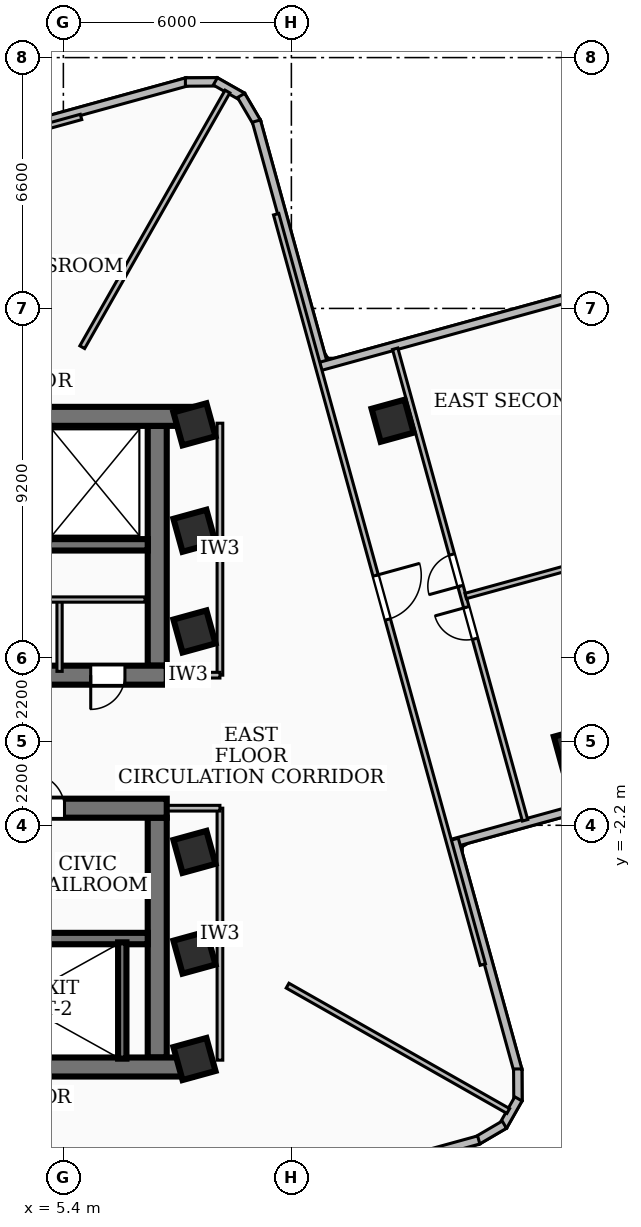
"""IFC4 building model, lengths in metres.
Left out: names, types, materials, properties, quantities, classifications, styles, units other than length and angle.
Written with IfcOpenShell. Run it as: python <this file> out.ifc"""

import sys

from ifc_helpers import new_model, si_unit, direction, frame, frame_2d, origin, origin_2d, place, context, subcontext, project, spatial, rectangle, extrude, element, fill, save


model = new_model("IFC4")
c1 = context("Model", 3, precision=1e-05, world=origin(), true_north=direction((0.0, 1.0)))
c2 = subcontext(c1, "Body", "Model", "MODEL_VIEW")
j1 = project(units=[si_unit("LENGTHUNIT", "METRE"), si_unit("PLANEANGLEUNIT", "RADIAN")], contexts=[c1])
p1 = place(None, origin())
s1 = spatial("IfcSite", under=j1, at=p1, CompositionType="ELEMENT")
p2 = place(p1, origin())
s2 = spatial("IfcBuilding", under=s1, at=p2, CompositionType="ELEMENT")
p3 = place(p2, frame((0.0, 0.0, 137.88)))
s3 = spatial("IfcBuildingStorey", under=s2, at=p3, CompositionType="ELEMENT", Elevation=137.88)
p4 = place(p3, frame((-8.78, 8.56, 0.0), z_axis=(0.0, 0.0, 1.0), x_axis=(1.0, 0.0, 0.0)))
e1 = element("IfcWall", 1, at=p4, inside=s3, PredefinedType="SHEAR", context=c2, shape_type="SweptSolid", body=[
    extrude(rectangle(XDim=17.56, YDim=0.5, at=frame_2d((8.78, 0.0))), origin(), (0.0, 0.0, 1.0), 3.32),
])
p5 = place(p3, frame((8.12, 1.75, 0.0), z_axis=(0.0, 0.0, 1.0), x_axis=(-1.0, 0.0, 0.0)))
e2 = element("IfcWall", 2, at=p5, inside=s3, PredefinedType="SHEAR", context=c2, shape_type="SweptSolid", body=[
    extrude(rectangle(XDim=16.24, YDim=0.5, at=frame_2d((8.12, 0.0))), origin(), (0.0, 0.0, 1.0), 3.32),
])
p6 = place(p5, frame((7.45, 0.0, 0.0)))
e3 = element("IfcOpeningElement", 3, at=p6, cuts=e2, PredefinedType="OPENING", context=c2, shape_type="SweptSolid", body=[
    extrude(rectangle(XDim=1.0, YDim=2.1, at=frame_2d((0.5, 1.05))), frame((0.0, 0.26, 0.0), z_axis=(0.0, -1.0, 0.0), x_axis=(1.0, 0.0, 0.0)), (0.0, 0.0, 1.0), 0.52),
])
p7 = place(p5, frame((3.4, 0.0, 0.0)))
e4 = element("IfcOpeningElement", 4, at=p7, cuts=e2, PredefinedType="OPENING", context=c2, shape_type="SweptSolid", body=[
    extrude(rectangle(XDim=0.9, YDim=2.06, at=frame_2d((0.45, 1.03))), frame((0.0, 0.26, 0.0), z_axis=(0.0, -1.0, 0.0), x_axis=(1.0, 0.0, 0.0)), (0.0, 0.0, 1.0), 0.52),
])
p8 = place(p5, frame((1.1, 0.0, 0.0)))
e5 = element("IfcOpeningElement", 5, at=p8, cuts=e2, PredefinedType="OPENING", context=c2, shape_type="SweptSolid", body=[
    extrude(rectangle(XDim=0.9, YDim=2.06, at=frame_2d((0.45, 1.03))), frame((0.0, 0.26, 0.0), z_axis=(0.0, -1.0, 0.0), x_axis=(1.0, 0.0, 0.0)), (0.0, 0.0, 1.0), 0.52),
])
p9 = place(p3, frame((7.87, 8.31, 0.0), z_axis=(0.0, 0.0, 1.0), x_axis=(0.0, -1.0, 0.0)))
e6 = element("IfcWall", 6, at=p9, inside=s3, PredefinedType="SHEAR", context=c2, shape_type="SweptSolid", body=[
    extrude(rectangle(XDim=6.31, YDim=0.5, at=frame_2d((3.155, 0.0))), origin(), (0.0, 0.0, 1.0), 3.32),
])
p10 = place(p3, frame((7.62, 5.18, 0.0), z_axis=(0.0, 0.0, 1.0), x_axis=(-1.0, 0.0, 0.0)))
e7 = element("IfcWall", 7, at=p10, inside=s3, PredefinedType="SOLIDWALL", context=c2, shape_type="SweptSolid", body=[
    extrude(rectangle(XDim=15.24, YDim=0.3, at=frame_2d((7.62, 0.0))), origin(), (0.0, 0.0, 1.0), 3.32),
])
p11 = place(p10, frame((5.77, 0.0, 0.0)))
e8 = element("IfcOpeningElement", 8, at=p11, cuts=e7, PredefinedType="OPENING", context=c2, shape_type="SweptSolid", body=[
    extrude(rectangle(XDim=1.1, YDim=2.15, at=frame_2d((0.55, 1.075))), frame((0.0, 0.16, 0.0), z_axis=(0.0, -1.0, 0.0), x_axis=(1.0, 0.0, 0.0)), (0.0, 0.0, 1.0), 0.32),
])
p12 = place(p10, frame((2.97, 0.0, 0.0)))
e9 = element("IfcOpeningElement", 9, at=p12, cuts=e7, PredefinedType="OPENING", context=c2, shape_type="SweptSolid", body=[
    extrude(rectangle(XDim=1.1, YDim=2.15, at=frame_2d((0.55, 1.075))), frame((0.0, 0.16, 0.0), z_axis=(0.0, -1.0, 0.0), x_axis=(1.0, 0.0, 0.0)), (0.0, 0.0, 1.0), 0.32),
])
p13 = place(p10, frame((7.97, 0.0, 0.0)))
e10 = element("IfcOpeningElement", 10, at=p13, cuts=e7, PredefinedType="OPENING", context=c2, shape_type="SweptSolid", body=[
    extrude(rectangle(XDim=1.0, YDim=2.1, at=frame_2d((0.5, 1.05))), frame((0.0, 0.16, 0.0), z_axis=(0.0, -1.0, 0.0), x_axis=(1.0, 0.0, 0.0)), (0.0, 0.0, 1.0), 0.32),
])
p14 = place(p3, frame((8.78, -8.56, 0.0), z_axis=(0.0, 0.0, 1.0), x_axis=(-1.0, 0.0, 0.0)))
e11 = element("IfcWall", 11, at=p14, inside=s3, PredefinedType="SHEAR", context=c2, shape_type="SweptSolid", body=[
    extrude(rectangle(XDim=17.56, YDim=0.5, at=frame_2d((8.78, 0.0))), origin(), (0.0, 0.0, 1.0), 3.32),
])
p15 = place(p3, frame((-8.12, -1.75, 0.0), z_axis=(0.0, 0.0, 1.0), x_axis=(1.0, 0.0, 0.0)))
e12 = element("IfcWall", 12, at=p15, inside=s3, PredefinedType="SHEAR", context=c2, shape_type="SweptSolid", body=[
    extrude(rectangle(XDim=16.24, YDim=0.5, at=frame_2d((8.12, 0.0))), origin(), (0.0, 0.0, 1.0), 3.32),
])
p16 = place(p15, frame((7.45, 0.0, 0.0)))
e13 = element("IfcOpeningElement", 13, at=p16, cuts=e12, PredefinedType="OPENING", context=c2, shape_type="SweptSolid", body=[
    extrude(rectangle(XDim=1.0, YDim=2.1, at=frame_2d((0.5, 1.05))), frame((0.0, 0.26, 0.0), z_axis=(0.0, -1.0, 0.0), x_axis=(1.0, 0.0, 0.0)), (0.0, 0.0, 1.0), 0.52),
])
p17 = place(p15, frame((12.65, 0.0, 0.0)))
e14 = element("IfcOpeningElement", 14, at=p17, cuts=e12, PredefinedType="OPENING", context=c2, shape_type="SweptSolid", body=[
    extrude(rectangle(XDim=0.9, YDim=2.06, at=frame_2d((0.45, 1.03))), frame((0.0, 0.26, 0.0), z_axis=(0.0, -1.0, 0.0), x_axis=(1.0, 0.0, 0.0)), (0.0, 0.0, 1.0), 0.52),
])
p18 = place(p15, frame((0.565, 0.0, 0.0)))
e15 = element("IfcOpeningElement", 15, at=p18, cuts=e12, PredefinedType="OPENING", context=c2, shape_type="SweptSolid", body=[
    extrude(rectangle(XDim=1.05, YDim=2.15, at=frame_2d((0.525, 1.075))), frame((0.0, 0.26, 0.0), z_axis=(0.0, -1.0, 0.0), x_axis=(1.0, 0.0, 0.0)), (0.0, 0.0, 1.0), 0.52),
])
p19 = place(p15, frame((2.125, 0.0, 0.0)))
e16 = element("IfcOpeningElement", 16, at=p19, cuts=e12, PredefinedType="OPENING", context=c2, shape_type="SweptSolid", body=[
    extrude(rectangle(XDim=1.05, YDim=2.15, at=frame_2d((0.525, 1.075))), frame((0.0, 0.26, 0.0), z_axis=(0.0, -1.0, 0.0), x_axis=(1.0, 0.0, 0.0)), (0.0, 0.0, 1.0), 0.52),
])
p20 = place(p15, frame((3.685, 0.0, 0.0)))
e17 = element("IfcOpeningElement", 17, at=p20, cuts=e12, PredefinedType="OPENING", context=c2, shape_type="SweptSolid", body=[
    extrude(rectangle(XDim=1.05, YDim=2.15, at=frame_2d((0.525, 1.075))), frame((0.0, 0.26, 0.0), z_axis=(0.0, -1.0, 0.0), x_axis=(1.0, 0.0, 0.0)), (0.0, 0.0, 1.0), 0.52),
])
p21 = place(p3, frame((7.87, -2.0, 0.0), z_axis=(0.0, 0.0, 1.0), x_axis=(0.0, -1.0, 0.0)))
e18 = element("IfcWall", 18, at=p21, inside=s3, PredefinedType="SHEAR", context=c2, shape_type="SweptSolid", body=[
    extrude(rectangle(XDim=6.31, YDim=0.5, at=frame_2d((3.155, 0.0))), origin(), (0.0, 0.0, 1.0), 3.32),
])
p22 = place(p3, frame((-7.62, -5.18, 0.0), z_axis=(0.0, 0.0, 1.0), x_axis=(1.0, 0.0, 0.0)))
e19 = element("IfcWall", 19, at=p22, inside=s3, PredefinedType="SOLIDWALL", context=c2, shape_type="SweptSolid", body=[
    extrude(rectangle(XDim=15.24, YDim=0.3, at=frame_2d((7.62, 0.0))), origin(), (0.0, 0.0, 1.0), 3.32),
])
p23 = place(p22, frame((5.77, 0.0, 0.0)))
e20 = element("IfcOpeningElement", 20, at=p23, cuts=e19, PredefinedType="OPENING", context=c2, shape_type="SweptSolid", body=[
    extrude(rectangle(XDim=1.1, YDim=2.15, at=frame_2d((0.55, 1.075))), frame((0.0, 0.16, 0.0), z_axis=(0.0, -1.0, 0.0), x_axis=(1.0, 0.0, 0.0)), (0.0, 0.0, 1.0), 0.32),
])
p24 = place(p22, frame((7.97, 0.0, 0.0)))
e21 = element("IfcOpeningElement", 21, at=p24, cuts=e19, PredefinedType="OPENING", context=c2, shape_type="SweptSolid", body=[
    extrude(rectangle(XDim=1.0, YDim=2.1, at=frame_2d((0.5, 1.05))), frame((0.0, 0.16, 0.0), z_axis=(0.0, -1.0, 0.0), x_axis=(1.0, 0.0, 0.0)), (0.0, 0.0, 1.0), 0.32),
])
p25 = place(p3, frame((6.95, -8.34, 0.0), z_axis=(0.0, 0.0, 1.0), x_axis=(0.0, 1.0, 0.0)))
e22 = element("IfcWall", 22, at=p25, inside=s3, PredefinedType="SOLIDWALL", context=c2, shape_type="SweptSolid", body=[
    extrude(rectangle(XDim=3.06, YDim=0.22, at=frame_2d((1.53, 0.0))), origin(), (0.0, 0.0, 1.0), 3.32),
])
for number, where, z_axis, x_axis in (
    (23, (8.85, -5.55, 0.0), (0.0, 0.0, 1.0), (0.964, 0.266, 0.0)),
    (24, (8.85, -2.9, 0.0), (0.0, 0.0, 1.0), (0.964, 0.266, 0.0)),
    (25, (8.85, 2.9, 0.0), (0.0, 0.0, 1.0), (0.964, 0.266, 0.0)),
    (26, (8.85, 5.55, 0.0), (0.0, 0.0, 1.0), (0.964, 0.266, 0.0)),
    (27, (8.85, -8.35, 0.0), (0.0, 0.0, 1.0), (0.964, 0.266, 0.0)),
    (28, (8.85, 8.35, 0.0), (0.0, 0.0, 1.0), (0.964, 0.266, 0.0)),
    (29, (18.86, -0.183, 0.0), (0.0, 0.0, 1.0), (0.964, 0.266, 0.0)),
    (30, (14.064, 8.445, 0.0), (0.0, 0.0, 1.0), (0.964, 0.266, 0.0)),
):
    element("IfcColumn", number, at=place(p3, frame(where, z_axis=z_axis, x_axis=x_axis)), inside=s3, PredefinedType="COLUMN", context=c2, shape_type="SweptSolid", body=[
        extrude(rectangle(XDim=0.9, YDim=0.9, at=origin_2d()), origin(), (0.0, 0.0, 1.0), 3.6),
    ])
p26 = place(p3, frame((2.568, 15.686, 0.0), z_axis=(0.0, 0.0, 1.0), x_axis=(0.964094670911, 0.265558779784, 0.0)))
e31 = element("IfcWall", 31, at=p26, inside=s3, PredefinedType="SOLIDWALL", context=c2, shape_type="SweptSolid", body=[
    extrude(rectangle(XDim=6.319, YDim=0.22, at=frame_2d((3.159, 0.0))), origin(), (0.0, 0.0, 1.0), 2.55),
])
p27 = place(p3, frame((8.611, 17.357, 0.0), z_axis=(0.0, 0.0, 1.0), x_axis=(0.999981148579, 0.006140235123, 0.0)))
e32 = element("IfcWall", 32, at=p27, inside=s3, PredefinedType="SOLIDWALL", context=c2, shape_type="SweptSolid", body=[
    extrude(rectangle(XDim=0.835, YDim=0.22, at=frame_2d((0.417, 0.0))), origin(), (0.0, 0.0, 1.0), 3.32),
])
p28 = place(p3, frame((9.399, 17.374, 0.0), z_axis=(0.0, 0.0, 1.0), x_axis=(0.87005199541, -0.492959963164, 0.0)))
e33 = element("IfcWall", 33, at=p28, inside=s3, PredefinedType="SOLIDWALL", context=c2, shape_type="SweptSolid", body=[
    extrude(rectangle(XDim=0.82, YDim=0.22, at=frame_2d((0.41, 0.0))), origin(), (0.0, 0.0, 1.0), 3.32),
])
p29 = place(p3, frame((10.077, 17.004, 0.0), z_axis=(0.0, 0.0, 1.0), x_axis=(0.505779557172, -0.862662761192, 0.0)))
e34 = element("IfcWall", 34, at=p29, inside=s3, PredefinedType="SOLIDWALL", context=c2, shape_type="SweptSolid", body=[
    extrude(rectangle(XDim=0.834, YDim=0.22, at=frame_2d((0.417, 0.0))), origin(), (0.0, 0.0, 1.0), 3.32),
])
p30 = place(p3, frame((10.479, 16.33, 0.0), z_axis=(0.0, 0.0, 1.0), x_axis=(0.265567840793, -0.964092175021, 0.0)))
e35 = element("IfcWall", 35, at=p30, inside=s3, PredefinedType="SOLIDWALL", context=c2, shape_type="SweptSolid", body=[
    extrude(rectangle(XDim=6.759, YDim=0.22, at=frame_2d((3.379, 0.0))), origin(), (0.0, 0.0, 1.0), 2.624),
])
p31 = place(p3, frame((12.166, 9.876, 0.0), z_axis=(0.0, 0.0, 1.0), x_axis=(0.964099811745, 0.2655401156, 0.0)))
e36 = element("IfcWall", 36, at=p31, inside=s3, PredefinedType="SOLIDWALL", context=c2, shape_type="SweptSolid", body=[
    extrude(rectangle(XDim=13.459, YDim=0.22, at=frame_2d((6.729, 0.0))), origin(), (0.0, 0.0, 1.0), 2.624),
])
p32 = place(p3, frame((28.599, 0.897, 0.0), z_axis=(0.0, 0.0, 1.0), x_axis=(-0.964113270695, -0.265491245185, 0.0)))
e37 = element("IfcWall", 37, at=p32, inside=s3, PredefinedType="SOLIDWALL", context=c2, shape_type="SweptSolid", body=[
    extrude(rectangle(XDim=13.458, YDim=0.22, at=frame_2d((6.729, 0.0))), origin(), (0.0, 0.0, 1.0), 3.32),
])
p33 = place(p32, frame((1.1, 0.0, 0.85)))
e38 = element("IfcOpeningElement", 38, at=p33, cuts=e37, PredefinedType="OPENING", context=c2, shape_type="SweptSolid", body=[
    extrude(rectangle(XDim=1.8, YDim=1.6, at=frame_2d((0.9, 0.8))), frame((0.0, 0.12, 0.0), z_axis=(0.0, -1.0, 0.0), x_axis=(1.0, 0.0, 0.0)), (0.0, 0.0, 1.0), 0.24),
])
p34 = place(p3, frame((15.686, -2.568, 0.0), z_axis=(0.0, 0.0, 1.0), x_axis=(0.265558779784, -0.964094670911, 0.0)))
e39 = element("IfcWall", 39, at=p34, inside=s3, PredefinedType="SOLIDWALL", context=c2, shape_type="SweptSolid", body=[
    extrude(rectangle(XDim=6.319, YDim=0.22, at=frame_2d((3.159, 0.0))), origin(), (0.0, 0.0, 1.0), 3.32),
])
p35 = place(p3, frame((17.357, -8.611, 0.0), z_axis=(0.0, 0.0, 1.0), x_axis=(0.006140235123, -0.999981148579, 0.0)))
e40 = element("IfcWall", 40, at=p35, inside=s3, PredefinedType="SOLIDWALL", context=c2, shape_type="SweptSolid", body=[
    extrude(rectangle(XDim=0.835, YDim=0.22, at=frame_2d((0.417, 0.0))), origin(), (0.0, 0.0, 1.0), 3.32),
])
p36 = place(p3, frame((17.374, -9.399, 0.0), z_axis=(0.0, 0.0, 1.0), x_axis=(-0.492959963164, -0.87005199541, 0.0)))
e41 = element("IfcWall", 41, at=p36, inside=s3, PredefinedType="SOLIDWALL", context=c2, shape_type="SweptSolid", body=[
    extrude(rectangle(XDim=0.82, YDim=0.22, at=frame_2d((0.41, 0.0))), origin(), (0.0, 0.0, 1.0), 3.32),
])
p37 = place(p3, frame((17.004, -10.077, 0.0), z_axis=(0.0, 0.0, 1.0), x_axis=(-0.862662761192, -0.505779557172, 0.0)))
e42 = element("IfcWall", 42, at=p37, inside=s3, PredefinedType="SOLIDWALL", context=c2, shape_type="SweptSolid", body=[
    extrude(rectangle(XDim=0.834, YDim=0.22, at=frame_2d((0.417, 0.0))), origin(), (0.0, 0.0, 1.0), 3.32),
])
p38 = place(p3, frame((16.33, -10.479, 0.0), z_axis=(0.0, 0.0, 1.0), x_axis=(-0.964092175021, -0.265567840793, 0.0)))
e43 = element("IfcWall", 43, at=p38, inside=s3, PredefinedType="SOLIDWALL", context=c2, shape_type="SweptSolid", body=[
    extrude(rectangle(XDim=6.759, YDim=0.22, at=frame_2d((3.379, 0.0))), origin(), (0.0, 0.0, 1.0), 3.32),
])
p39 = place(p3, frame((2.9, 3.74, 0.0), z_axis=(0.0, 0.0, 1.0), x_axis=(1.0, 0.0, 0.0)))
e44 = element("IfcWall", 44, at=p39, inside=s3, PredefinedType="PARTITIONING", context=c2, shape_type="SweptSolid", body=[
    extrude(rectangle(XDim=4.65, YDim=0.138, at=frame_2d((2.325, 0.0))), origin(), (0.0, 0.0, 1.0), 3.32),
])
p40 = place(p3, frame((5.3, 1.85, 0.0), z_axis=(0.0, 0.0, 1.0), x_axis=(0.0, 1.0, 0.0)))
e45 = element("IfcWall", 45, at=p40, inside=s3, PredefinedType="PARTITIONING", context=c2, shape_type="SweptSolid", body=[
    extrude(rectangle(XDim=1.89, YDim=0.138, at=frame_2d((0.945, 0.0))), origin(), (0.0, 0.0, 1.0), 2.55),
])
p41 = place(p3, frame((9.52, 1.75, 0.0), z_axis=(0.0, 0.0, 1.0), x_axis=(0.0, 1.0, 0.0)))
e46 = element("IfcWall", 46, at=p41, inside=s3, PredefinedType="PARTITIONING", context=c2, shape_type="SweptSolid", body=[
    extrude(rectangle(XDim=6.63, YDim=0.15, at=frame_2d((3.315, 0.0))), origin(), (0.0, 0.0, 1.0), 2.55),
])
p42 = place(p3, frame((7.85, 1.75, 0.0), z_axis=(0.0, 0.0, 1.0), x_axis=(1.0, 0.0, 0.0)))
e47 = element("IfcWall", 47, at=p42, inside=s3, PredefinedType="PARTITIONING", context=c2, shape_type="SweptSolid", body=[
    extrude(rectangle(XDim=1.67, YDim=0.15, at=frame_2d((0.835, 0.0))), origin(), (0.0, 0.0, 1.0), 2.55),
])
p43 = place(p3, frame((9.52, -8.38, 0.0), z_axis=(0.0, 0.0, 1.0), x_axis=(0.0, 1.0, 0.0)))
e48 = element("IfcWall", 48, at=p43, inside=s3, PredefinedType="PARTITIONING", context=c2, shape_type="SweptSolid", body=[
    extrude(rectangle(XDim=6.63, YDim=0.15, at=frame_2d((3.315, 0.0))), origin(), (0.0, 0.0, 1.0), 2.55),
])
p44 = place(p3, frame((7.85, -1.75, 0.0), z_axis=(0.0, 0.0, 1.0), x_axis=(1.0, 0.0, 0.0)))
e49 = element("IfcWall", 49, at=p44, inside=s3, PredefinedType="PARTITIONING", context=c2, shape_type="SweptSolid", body=[
    extrude(rectangle(XDim=1.67, YDim=0.15, at=frame_2d((0.835, 0.0))), origin(), (0.0, 0.0, 1.0), 2.55),
])
p45 = place(p3, frame((5.897, 10.38, 0.0), z_axis=(0.0, 0.0, 1.0), x_axis=(0.49389771586, 0.869520009125, 0.0)))
e50 = element("IfcWall", 50, at=p45, inside=s3, PredefinedType="PARTITIONING", context=c2, shape_type="SweptSolid", body=[
    extrude(rectangle(XDim=7.737, YDim=0.145, at=frame_2d((3.868, 0.0))), origin(), (0.0, 0.0, 1.0), 2.55),
])
p46 = place(p3, frame((11.3, -6.419, 0.0), z_axis=(0.0, 0.0, 1.0), x_axis=(0.869475469758, -0.493976120363, 0.0)))
e51 = element("IfcWall", 51, at=p46, inside=s3, PredefinedType="PARTITIONING", context=c2, shape_type="SweptSolid", body=[
    extrude(rectangle(XDim=6.679, YDim=0.145, at=frame_2d((3.339, 0.0))), origin(), (0.0, 0.0, 1.0), 3.32),
])
p47 = place(p3, frame((10.999, 13.879, 0.0), z_axis=(0.0, 0.0, 1.0), x_axis=(0.26558288107, -0.964088031915, 0.0)))
e52 = element("IfcWall", 52, at=p47, inside=s3, PredefinedType="PARTITIONING", context=c2, shape_type="SweptSolid", body=[
    extrude(rectangle(XDim=20.479, YDim=0.145, at=frame_2d((10.24, 0.0))), origin(), (0.0, 0.0, 1.0), 2.55),
])
p48 = place(p47, frame((9.86, 0.0, 0.0)))
e53 = element("IfcOpeningElement", 53, at=p48, cuts=e52, PredefinedType="OPENING", context=c2, shape_type="SweptSolid", body=[
    extrude(rectangle(XDim=1.2, YDim=2.1, at=frame_2d((0.6, 1.05))), frame((0.0, 0.083, 0.0), z_axis=(0.0, -1.0, 0.0), x_axis=(1.0, 0.0, 0.0)), (0.0, 0.0, 1.0), 0.165),
])
p49 = place(p3, frame((15.986, 3.833, 0.0), z_axis=(0.0, 0.0, 1.0), x_axis=(0.964097539176, 0.265548366506, 0.0)))
e54 = element("IfcWall", 54, at=p49, inside=s3, PredefinedType="PARTITIONING", context=c2, shape_type="SweptSolid", body=[
    extrude(rectangle(XDim=12.785, YDim=0.145, at=frame_2d((6.393, 0.0))), origin(), (0.0, 0.0, 1.0), 2.812),
])
p50 = place(p3, frame((17.549, -2.069, 0.0), z_axis=(0.0, 0.0, 1.0), x_axis=(-0.265569130282, 0.964091819819, 0.0)))
e55 = element("IfcWall", 55, at=p50, inside=s3, PredefinedType="PARTITIONING", context=c2, shape_type="SweptSolid", body=[
    extrude(rectangle(XDim=12.87, YDim=0.145, at=frame_2d((6.435, 0.0))), origin(), (0.0, 0.0, 1.0), 2.55),
])
p51 = place(p50, frame((4.955, 0.0, 0.0)))
e56 = element("IfcOpeningElement", 56, at=p51, cuts=e55, PredefinedType="OPENING", context=c2, shape_type="SweptSolid", body=[
    extrude(rectangle(XDim=0.86, YDim=2.04, at=frame_2d((0.43, 1.02))), frame((0.0, 0.083, 0.0), z_axis=(0.0, -1.0, 0.0), x_axis=(1.0, 0.0, 0.0)), (0.0, 0.0, 1.0), 0.165),
])
p52 = place(p50, frame((6.395, 0.0, 0.0)))
e57 = element("IfcOpeningElement", 57, at=p52, cuts=e55, PredefinedType="OPENING", context=c2, shape_type="SweptSolid", body=[
    extrude(rectangle(XDim=0.86, YDim=2.04, at=frame_2d((0.43, 1.02))), frame((0.0, 0.083, 0.0), z_axis=(0.0, -1.0, 0.0), x_axis=(1.0, 0.0, 0.0)), (0.0, 0.0, 1.0), 0.165),
])
p53 = place(p3, frame((-13.879, 10.999, 0.0), z_axis=(0.0, 0.0, 1.0), x_axis=(0.964088031915, 0.26558288107, 0.0)))
e58 = element("IfcWall", 58, at=p53, inside=s3, PredefinedType="PARTITIONING", context=c2, shape_type="SweptSolid", body=[
    extrude(rectangle(XDim=20.479, YDim=0.145, at=frame_2d((10.24, 0.0))), origin(), (0.0, 0.0, 1.0), 2.55),
])
p54 = place(p53, frame((9.86, 0.0, 0.0)))
e59 = element("IfcOpeningElement", 59, at=p54, cuts=e58, PredefinedType="OPENING", context=c2, shape_type="SweptSolid", body=[
    extrude(rectangle(XDim=1.2, YDim=2.1, at=frame_2d((0.6, 1.05))), frame((0.0, 0.083, 0.0), z_axis=(0.0, -1.0, 0.0), x_axis=(1.0, 0.0, 0.0)), (0.0, 0.0, 1.0), 0.165),
])
p55 = place(p17, origin())
e60 = element("IfcDoor", 60, at=p55, inside=s3, OperationType="SINGLE_SWING_LEFT", PredefinedType="DOOR", context=c2, shape_type="SweptSolid", body=[
    extrude(rectangle(XDim=0.9, YDim=2.06, at=frame_2d((0.45, 1.03))), frame((0.0, 0.025, 0.0), z_axis=(0.0, -1.0, 0.0), x_axis=(1.0, 0.0, 0.0)), (0.0, 0.0, 1.0), 0.05),
])
fill(e14, e60)
p56 = place(p8, origin())
e61 = element("IfcDoor", 61, at=p56, inside=s3, OperationType="SINGLE_SWING_RIGHT", PredefinedType="DOOR", context=c2, shape_type="SweptSolid", body=[
    extrude(rectangle(XDim=0.9, YDim=2.06, at=frame_2d((0.45, 1.03))), frame((0.0, 0.025, 0.0), z_axis=(0.0, -1.0, 0.0), x_axis=(1.0, 0.0, 0.0)), (0.0, 0.0, 1.0), 0.05),
])
fill(e5, e61)
p57 = place(p48, origin())
e62 = element("IfcDoor", 62, at=p57, inside=s3, OperationType="SINGLE_SWING_LEFT", PredefinedType="DOOR", context=c2, shape_type="SweptSolid", body=[
    extrude(rectangle(XDim=1.2, YDim=2.1, at=frame_2d((0.6, 1.05))), frame((0.0, 0.025, 0.0), z_axis=(0.0, -1.0, 0.0), x_axis=(1.0, 0.0, 0.0)), (0.0, 0.0, 1.0), 0.05),
])
fill(e53, e62)
p58 = place(p51, origin())
e63 = element("IfcDoor", 63, at=p58, inside=s3, OperationType="SINGLE_SWING_RIGHT", PredefinedType="DOOR", context=c2, shape_type="SweptSolid", body=[
    extrude(rectangle(XDim=0.86, YDim=2.04, at=frame_2d((0.43, 1.02))), frame((0.0, 0.025, 0.0), z_axis=(0.0, -1.0, 0.0), x_axis=(1.0, 0.0, 0.0)), (0.0, 0.0, 1.0), 0.05),
])
fill(e56, e63)
p59 = place(p52, origin())
e64 = element("IfcDoor", 64, at=p59, inside=s3, OperationType="SINGLE_SWING_LEFT", PredefinedType="DOOR", context=c2, shape_type="SweptSolid", body=[
    extrude(rectangle(XDim=0.86, YDim=2.04, at=frame_2d((0.43, 1.02))), frame((0.0, 0.025, 0.0), z_axis=(0.0, -1.0, 0.0), x_axis=(1.0, 0.0, 0.0)), (0.0, 0.0, 1.0), 0.05),
])
fill(e57, e64)
save(model, sys.argv[1])
